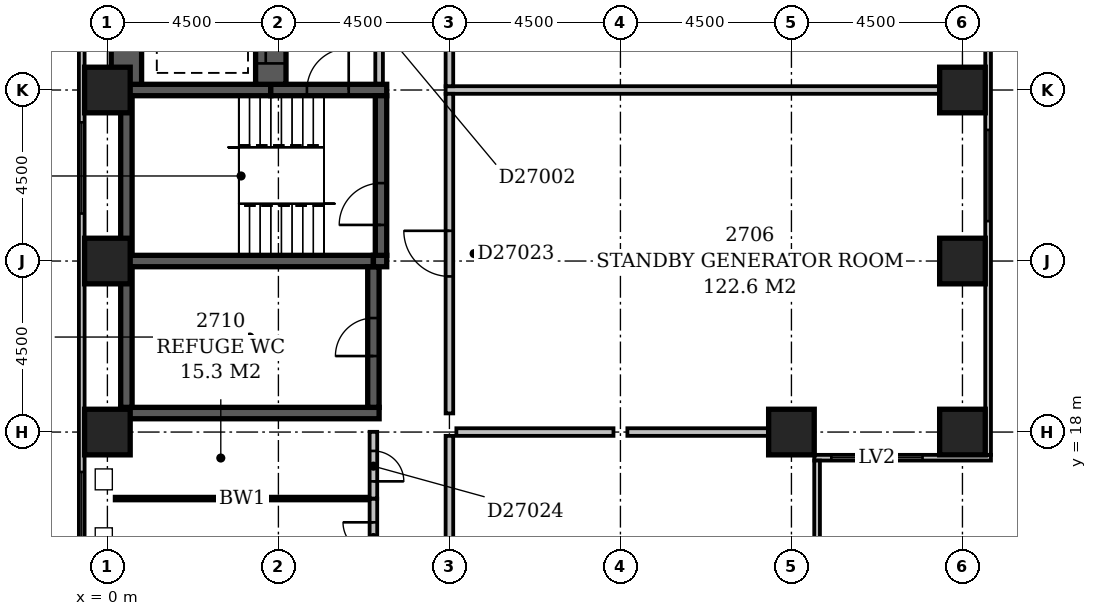
"""IFC4 building model, lengths in metres.
Left out: names, types, materials, properties, quantities, classifications, styles, units other than length and angle.
Written with IfcOpenShell. Run it as: python <this file> out.ifc"""

import sys

from ifc_helpers import new_model, si_unit, direction, frame, frame_2d, origin, origin_2d, place, context, subcontext, project, spatial, rectangle, extrude, element, fill, save


model = new_model("IFC4")
c1 = context("Model", 3, precision=1e-05, world=origin(), true_north=direction((0.0, 1.0)))
c2 = subcontext(c1, "Body", "Model", "MODEL_VIEW")
j1 = project(units=[si_unit("LENGTHUNIT", "METRE"), si_unit("PLANEANGLEUNIT", "RADIAN")], contexts=[c1])
p1 = place(None, origin())
s1 = spatial("IfcSite", under=j1, at=p1, CompositionType="ELEMENT")
p2 = place(p1, origin())
s2 = spatial("IfcBuilding", under=s1, at=p2, CompositionType="ELEMENT")
p3 = place(p2, frame((0.0, 0.0, 108.2)))
s3 = spatial("IfcBuildingStorey", under=s2, at=p3, CompositionType="ELEMENT", Elevation=108.2)
p4 = place(p3, frame((0.35, 18.5, -0.45), z_axis=(0.0, 0.0, 1.0), x_axis=(1.0, 0.0, 0.0)))
e1 = element("IfcWall", 1, at=p4, inside=s3, PredefinedType="SHEAR", context=c2, shape_type="SweptSolid", body=[
    extrude(rectangle(XDim=6.8, YDim=0.3, at=frame_2d((3.4, 0.0))), origin(), (0.0, 0.0, 1.0), 5.35),
])
p5 = place(p3, frame((0.35, 22.5, -0.45), z_axis=(0.0, 0.0, 1.0), x_axis=(1.0, 0.0, 0.0)))
e2 = element("IfcWall", 2, at=p5, inside=s3, PredefinedType="SHEAR", context=c2, shape_type="SweptSolid", body=[
    extrude(rectangle(XDim=6.65, YDim=0.3, at=frame_2d((3.325, 0.0))), origin(), (0.0, 0.0, 1.0), 5.35),
])
p6 = place(p3, frame((0.35, 27.0, -0.45), z_axis=(0.0, 0.0, 1.0), x_axis=(1.0, 0.0, 0.0)))
e3 = element("IfcWall", 3, at=p6, inside=s3, PredefinedType="SHEAR", context=c2, shape_type="SweptSolid", body=[
    extrude(rectangle(XDim=3.95, YDim=0.3, at=frame_2d((1.975, 0.0))), origin(), (0.0, 0.0, 1.0), 5.35),
])
p7 = place(p3, frame((0.5, 18.65, -0.45), z_axis=(0.0, 0.0, 1.0), x_axis=(0.0, 1.0, 0.0)))
e4 = element("IfcWall", 4, at=p7, inside=s3, PredefinedType="SHEAR", context=c2, shape_type="SweptSolid", body=[
    extrude(rectangle(XDim=3.7, YDim=0.3, at=frame_2d((1.85, 0.0))), origin(), (0.0, 0.0, 1.0), 5.35),
])
p8 = place(p3, frame((0.5, 22.65, -0.45), z_axis=(0.0, 0.0, 1.0), x_axis=(0.0, 1.0, 0.0)))
e5 = element("IfcWall", 5, at=p8, inside=s3, PredefinedType="SHEAR", context=c2, shape_type="SweptSolid", body=[
    extrude(rectangle(XDim=4.2, YDim=0.3, at=frame_2d((2.1, 0.0))), origin(), (0.0, 0.0, 1.0), 5.35),
])
p9 = place(p3, frame((0.5, 27.15, 0.0), z_axis=(0.0, 0.0, 1.0), x_axis=(0.0, 1.0, 0.0)))
e6 = element("IfcWall", 6, at=p9, inside=s3, PredefinedType="SHEAR", context=c2, shape_type="SweptSolid", body=[
    extrude(rectangle(XDim=21.95, YDim=0.8, at=frame_2d((10.975, 0.0))), origin(), (0.0, 0.0, 1.0), 4.9),
])
p10 = place(p3, frame((4.3, 27.0, -0.45), z_axis=(0.0, 0.0, 1.0), x_axis=(1.0, 0.0, 0.0)))
e7 = element("IfcWall", 7, at=p10, inside=s3, PredefinedType="SHEAR", context=c2, shape_type="SweptSolid", body=[
    extrude(rectangle(XDim=3.05, YDim=0.3, at=frame_2d((1.525, 0.0))), origin(), (0.0, 0.0, 1.0), 5.35),
])
p11 = place(p10, frame((0.95, 0.0, 0.45)))
e8 = element("IfcOpeningElement", 8, at=p11, cuts=e7, PredefinedType="OPENING", context=c2, shape_type="SweptSolid", body=[
    extrude(rectangle(XDim=1.1, YDim=2.1, at=frame_2d((0.55, 1.05))), frame((0.0, 0.162, 0.0), z_axis=(0.0, -1.0, 0.0), x_axis=(1.0, 0.0, 0.0)), (0.0, 0.0, 1.0), 0.324),
])
p12 = place(p3, frame((4.3, 27.15, 0.0), z_axis=(0.0, 0.0, 1.0), x_axis=(0.0, 1.0, 0.0)))
e9 = element("IfcWall", 9, at=p12, inside=s3, PredefinedType="SHEAR", context=c2, shape_type="SweptSolid", body=[
    extrude(rectangle(XDim=21.95, YDim=0.8, at=frame_2d((10.975, 0.0))), origin(), (0.0, 0.0, 1.0), 4.9),
])
p13 = place(p12, frame((3.05, 0.0, 0.0)))
e10 = element("IfcOpeningElement", 10, at=p13, cuts=e9, PredefinedType="OPENING", context=c2, shape_type="SweptSolid", body=[
    extrude(rectangle(XDim=1.1, YDim=2.1, at=frame_2d((0.55, 1.05))), frame((0.0, 0.412, 0.0), z_axis=(0.0, -1.0, 0.0), x_axis=(1.0, 0.0, 0.0)), (0.0, 0.0, 1.0), 0.824),
])
p14 = place(p12, frame((0.55, 0.0, 0.0)))
e11 = element("IfcOpeningElement", 11, at=p14, cuts=e9, PredefinedType="OPENING", context=c2, shape_type="SweptSolid", body=[
    extrude(rectangle(XDim=1.1, YDim=2.1, at=frame_2d((0.55, 1.05))), frame((0.0, 0.412, 0.0), z_axis=(0.0, -1.0, 0.0), x_axis=(1.0, 0.0, 0.0)), (0.0, 0.0, 1.0), 0.824),
])
p15 = place(p12, frame((5.55, 0.0, 0.0)))
e12 = element("IfcOpeningElement", 12, at=p15, cuts=e9, PredefinedType="OPENING", context=c2, shape_type="SweptSolid", body=[
    extrude(rectangle(XDim=1.1, YDim=2.1, at=frame_2d((0.55, 1.05))), frame((0.0, 0.412, 0.0), z_axis=(0.0, -1.0, 0.0), x_axis=(1.0, 0.0, 0.0)), (0.0, 0.0, 1.0), 0.824),
])
p16 = place(p3, frame((7.0, 18.65, -0.45), z_axis=(0.0, 0.0, 1.0), x_axis=(0.0, 1.0, 0.0)))
e13 = element("IfcWall", 13, at=p16, inside=s3, PredefinedType="SHEAR", context=c2, shape_type="SweptSolid", body=[
    extrude(rectangle(XDim=3.7, YDim=0.3, at=frame_2d((1.85, 0.0))), origin(), (0.0, 0.0, 1.0), 5.35),
])
p17 = place(p16, frame((1.35, 0.0, 0.45)))
e14 = element("IfcOpeningElement", 14, at=p17, cuts=e13, PredefinedType="OPENING", context=c2, shape_type="SweptSolid", body=[
    extrude(rectangle(XDim=1.0, YDim=2.1, at=frame_2d((0.5, 1.05))), frame((0.0, 0.162, 0.0), z_axis=(0.0, -1.0, 0.0), x_axis=(1.0, 0.0, 0.0)), (0.0, 0.0, 1.0), 0.324),
])
p18 = place(p3, frame((7.0, 22.5, -0.45), z_axis=(0.0, 0.0, 1.0), x_axis=(1.0, 0.0, 0.0)))
e15 = element("IfcWall", 15, at=p18, inside=s3, PredefinedType="SHEAR", context=c2, shape_type="SweptSolid", body=[
    extrude(rectangle(XDim=0.35, YDim=0.3, at=frame_2d((0.175, 0.0))), origin(), (0.0, 0.0, 1.0), 5.35),
])
p19 = place(p3, frame((7.2, 22.65, -0.45), z_axis=(0.0, 0.0, 1.0), x_axis=(0.0, 1.0, 0.0)))
e16 = element("IfcWall", 16, at=p19, inside=s3, PredefinedType="SHEAR", context=c2, shape_type="SweptSolid", body=[
    extrude(rectangle(XDim=4.2, YDim=0.3, at=frame_2d((2.1, 0.0))), origin(), (0.0, 0.0, 1.0), 5.35),
])
p20 = place(p19, frame((0.8, 0.0, 0.45)))
e17 = element("IfcOpeningElement", 17, at=p20, cuts=e16, PredefinedType="OPENING", context=c2, shape_type="SweptSolid", body=[
    extrude(rectangle(XDim=1.1, YDim=2.1, at=frame_2d((0.55, 1.05))), frame((0.0, 0.162, 0.0), z_axis=(0.0, -1.0, 0.0), x_axis=(1.0, 0.0, 0.0)), (0.0, 0.0, 1.0), 0.324),
])
for number, where, z_axis, x_axis in (
    (18, (0.0, 18.0, -0.45), (0.0, 0.0, 1.0), (1.0, 0.0, 0.0)),
    (19, (18.0, 18.0, -0.45), (0.0, 0.0, 1.0), (1.0, 0.0, 0.0)),
    (20, (22.5, 18.0, -0.45), (0.0, 0.0, 1.0), (1.0, 0.0, 0.0)),
    (21, (0.0, 22.5, -0.45), (0.0, 0.0, 1.0), (1.0, 0.0, 0.0)),
    (22, (22.5, 22.5, -0.45), (0.0, 0.0, 1.0), (1.0, 0.0, 0.0)),
    (23, (0.0, 27.0, -0.45), (0.0, 0.0, 1.0), (1.0, 0.0, 0.0)),
    (24, (22.5, 27.0, -0.45), (0.0, 0.0, 1.0), (1.0, 0.0, 0.0)),
):
    element("IfcColumn", number, at=place(p3, frame(where, z_axis=z_axis, x_axis=x_axis)), inside=s3, PredefinedType="COLUMN", context=c2, shape_type="SweptSolid", body=[
        extrude(rectangle(XDim=1.2, YDim=1.2, at=origin_2d()), origin(), (0.0, 0.0, 1.0), 5.35),
    ])
p21 = place(p3, frame((18.675, 8.4, 0.0), z_axis=(0.0, 0.0, 1.0), x_axis=(0.0, 1.0, 0.0)))
e25 = element("IfcWall", 25, at=p21, inside=s3, PredefinedType="STANDARD", context=c2, shape_type="SweptSolid", body=[
    extrude(rectangle(XDim=8.85, YDim=0.15, at=frame_2d((4.425, 0.0))), origin(), (0.0, 0.0, 1.0), 4.3),
])
p22 = place(p21, frame((1.65, 0.0, 0.6)))
e26 = element("IfcOpeningElement", 26, at=p22, cuts=e25, PredefinedType="OPENING", context=c2, shape_type="SweptSolid", body=[
    extrude(rectangle(XDim=2.4, YDim=2.4, at=frame_2d((1.2, 1.2))), frame((0.0, 0.087, 0.0), z_axis=(0.0, -1.0, 0.0), x_axis=(1.0, 0.0, 0.0)), (0.0, 0.0, 1.0), 0.174),
])
p23 = place(p3, frame((18.6, 17.325, 0.0), z_axis=(0.0, 0.0, 1.0), x_axis=(1.0, 0.0, 0.0)))
e27 = element("IfcWall", 27, at=p23, inside=s3, PredefinedType="STANDARD", context=c2, shape_type="SweptSolid", body=[
    extrude(rectangle(XDim=4.65, YDim=0.15, at=frame_2d((2.325, 0.0))), origin(), (0.0, 0.0, 1.0), 4.3),
])
p24 = place(p23, frame((0.45, 0.0, 0.6)))
e28 = element("IfcOpeningElement", 28, at=p24, cuts=e27, PredefinedType="OPENING", context=c2, shape_type="SweptSolid", body=[
    extrude(rectangle(XDim=2.4, YDim=2.4, at=frame_2d((1.2, 1.2))), frame((0.0, 0.087, 0.0), z_axis=(0.0, -1.0, 0.0), x_axis=(1.0, 0.0, 0.0)), (0.0, 0.0, 1.0), 0.174),
])
p25 = place(p3, frame((23.175, 17.4, 0.0), z_axis=(0.0, 0.0, 1.0), x_axis=(0.0, 1.0, 0.0)))
e29 = element("IfcWall", 29, at=p25, inside=s3, PredefinedType="STANDARD", context=c2, shape_type="SweptSolid", body=[
    extrude(rectangle(XDim=17.85, YDim=0.15, at=frame_2d((8.925, 0.0))), origin(), (0.0, 0.0, 1.0), 4.3),
])
p26 = place(p25, frame((6.15, 0.0, 0.6)))
e30 = element("IfcOpeningElement", 30, at=p26, cuts=e29, PredefinedType="OPENING", context=c2, shape_type="SweptSolid", body=[
    extrude(rectangle(XDim=2.4, YDim=2.4, at=frame_2d((1.2, 1.2))), frame((0.0, 0.087, 0.0), z_axis=(0.0, -1.0, 0.0), x_axis=(1.0, 0.0, 0.0)), (0.0, 0.0, 1.0), 0.174),
])
p27 = place(p25, frame((15.15, 0.0, 0.6)))
e31 = element("IfcOpeningElement", 31, at=p27, cuts=e29, PredefinedType="OPENING", context=c2, shape_type="SweptSolid", body=[
    extrude(rectangle(XDim=2.4, YDim=2.4, at=frame_2d((1.2, 1.2))), frame((0.0, 0.087, 0.0), z_axis=(0.0, -1.0, 0.0), x_axis=(1.0, 0.0, 0.0)), (0.0, 0.0, 1.0), 0.174),
])
p28 = place(p3, frame((-0.675, 59.1, 0.0), z_axis=(0.0, 0.0, 1.0), x_axis=(0.0, -1.0, 0.0)))
e32 = element("IfcWall", 32, at=p28, inside=s3, PredefinedType="STANDARD", context=c2, shape_type="SweptSolid", body=[
    extrude(rectangle(XDim=55.35, YDim=0.15, at=frame_2d((27.675, 0.0))), origin(), (0.0, 0.0, 1.0), 4.3),
])
p29 = place(p28, frame((5.95, 0.0, 0.6)))
e33 = element("IfcOpeningElement", 33, at=p29, cuts=e32, PredefinedType="OPENING", context=c2, shape_type="SweptSolid", body=[
    extrude(rectangle(XDim=2.4, YDim=2.4, at=frame_2d((1.2, 1.2))), frame((0.0, 0.087, 0.0), z_axis=(0.0, -1.0, 0.0), x_axis=(1.0, 0.0, 0.0)), (0.0, 0.0, 1.0), 0.174),
])
p30 = place(p28, frame((15.15, 0.0, 0.6)))
e34 = element("IfcOpeningElement", 34, at=p30, cuts=e32, PredefinedType="OPENING", context=c2, shape_type="SweptSolid", body=[
    extrude(rectangle(XDim=2.4, YDim=2.4, at=frame_2d((1.2, 1.2))), frame((0.0, 0.087, 0.0), z_axis=(0.0, -1.0, 0.0), x_axis=(1.0, 0.0, 0.0)), (0.0, 0.0, 1.0), 0.174),
])
p31 = place(p28, frame((24.15, 0.0, 0.6)))
e35 = element("IfcOpeningElement", 35, at=p31, cuts=e32, PredefinedType="OPENING", context=c2, shape_type="SweptSolid", body=[
    extrude(rectangle(XDim=2.4, YDim=2.4, at=frame_2d((1.2, 1.2))), frame((0.0, 0.087, 0.0), z_axis=(0.0, -1.0, 0.0), x_axis=(1.0, 0.0, 0.0)), (0.0, 0.0, 1.0), 0.174),
])
p32 = place(p28, frame((32.95, 0.0, 0.6)))
e36 = element("IfcOpeningElement", 36, at=p32, cuts=e32, PredefinedType="OPENING", context=c2, shape_type="SweptSolid", body=[
    extrude(rectangle(XDim=2.4, YDim=2.4, at=frame_2d((1.2, 1.2))), frame((0.0, 0.087, 0.0), z_axis=(0.0, -1.0, 0.0), x_axis=(1.0, 0.0, 0.0)), (0.0, 0.0, 1.0), 0.174),
])
p33 = place(p28, frame((42.15, 0.0, 0.6)))
e37 = element("IfcOpeningElement", 37, at=p33, cuts=e32, PredefinedType="OPENING", context=c2, shape_type="SweptSolid", body=[
    extrude(rectangle(XDim=2.4, YDim=2.4, at=frame_2d((1.2, 1.2))), frame((0.0, 0.087, 0.0), z_axis=(0.0, -1.0, 0.0), x_axis=(1.0, 0.0, 0.0)), (0.0, 0.0, 1.0), 0.174),
])
p34 = place(p28, frame((51.15, 0.0, 0.6)))
e38 = element("IfcOpeningElement", 38, at=p34, cuts=e32, PredefinedType="OPENING", context=c2, shape_type="SweptSolid", body=[
    extrude(rectangle(XDim=2.4, YDim=2.4, at=frame_2d((1.2, 1.2))), frame((0.0, 0.087, 0.0), z_axis=(0.0, -1.0, 0.0), x_axis=(1.0, 0.0, 0.0)), (0.0, 0.0, 1.0), 0.174),
])
p35 = place(p3, frame((7.15, 27.17, 0.0), z_axis=(0.0, 0.0, 1.0), x_axis=(0.0, 1.0, 0.0)))
e39 = element("IfcWall", 39, at=p35, inside=s3, PredefinedType="PARTITIONING", context=c2, shape_type="SweptSolid", body=[
    extrude(rectangle(XDim=4.83, YDim=0.2, at=frame_2d((2.415, 0.0))), origin(), (0.0, 0.0, 1.0), 4.9),
])
p36 = place(p35, frame((1.73, 0.0, 0.0)))
e40 = element("IfcOpeningElement", 40, at=p36, cuts=e39, PredefinedType="OPENING", context=c2, shape_type="SweptSolid", body=[
    extrude(rectangle(XDim=1.2, YDim=2.1, at=frame_2d((0.6, 1.05))), frame((0.0, 0.112, 0.0), z_axis=(0.0, -1.0, 0.0), x_axis=(1.0, 0.0, 0.0)), (0.0, 0.0, 1.0), 0.224),
])
p37 = place(p3, frame((9.0, 9.1, 0.0), z_axis=(0.0, 0.0, 1.0), x_axis=(0.0, 1.0, 0.0)))
e41 = element("IfcWall", 41, at=p37, inside=s3, PredefinedType="PARTITIONING", context=c2, shape_type="SweptSolid", body=[
    extrude(rectangle(XDim=8.8, YDim=0.2, at=frame_2d((4.4, 0.0))), origin(), (0.0, 0.0, 1.0), 4.9),
])
p38 = place(p37, frame((3.8, 0.0, 0.0)))
e42 = element("IfcOpeningElement", 42, at=p38, cuts=e41, PredefinedType="OPENING", context=c2, shape_type="SweptSolid", body=[
    extrude(rectangle(XDim=1.2, YDim=2.1, at=frame_2d((0.6, 1.05))), frame((0.0, 0.112, 0.0), z_axis=(0.0, -1.0, 0.0), x_axis=(1.0, 0.0, 0.0)), (0.0, 0.0, 1.0), 0.224),
])
p39 = place(p3, frame((0.191, 16.25, 0.0), z_axis=(0.0, 0.0, 1.0), x_axis=(1.0, 0.0, 0.0)))
e43 = element("IfcWall", 43, at=p39, inside=s3, PredefinedType="PLUMBINGWALL", context=c2, shape_type="SweptSolid", body=[
    extrude(rectangle(XDim=6.708, YDim=0.1, at=frame_2d((3.354, 0.0))), origin(), (0.0, 0.0, 1.0), 4.9),
])
p40 = place(p3, frame((7.0, 16.25, 0.0), z_axis=(0.0, 0.0, 1.0), x_axis=(0.0, -1.0, 0.0)))
e44 = element("IfcWall", 44, at=p40, inside=s3, PredefinedType="PARTITIONING", context=c2, shape_type="SweptSolid", body=[
    extrude(rectangle(XDim=2.1, YDim=0.2, at=frame_2d((1.05, 0.0))), origin(), (0.0, 0.0, 1.0), 4.9),
])
p41 = place(p40, frame((0.625, 0.0, 0.0)))
e45 = element("IfcOpeningElement", 45, at=p41, cuts=e44, PredefinedType="OPENING", context=c2, shape_type="SweptSolid", body=[
    extrude(rectangle(XDim=0.8, YDim=2.1, at=frame_2d((0.4, 1.05))), frame((0.0, 0.112, 0.0), z_axis=(0.0, -1.0, 0.0), x_axis=(1.0, 0.0, 0.0)), (0.0, 0.0, 1.0), 0.224),
])
p42 = place(p3, frame((9.0, 18.49, 0.0), z_axis=(0.0, 0.0, 1.0), x_axis=(0.0, 1.0, 0.0)))
e46 = element("IfcWall", 46, at=p42, inside=s3, PredefinedType="PARTITIONING", context=c2, shape_type="SweptSolid", body=[
    extrude(rectangle(XDim=8.409, YDim=0.2, at=frame_2d((4.205, 0.0))), origin(), (0.0, 0.0, 1.0), 4.9),
])
p43 = place(p42, frame((3.605, 0.0, 0.0)))
e47 = element("IfcOpeningElement", 47, at=p43, cuts=e46, PredefinedType="OPENING", context=c2, shape_type="SweptSolid", body=[
    extrude(rectangle(XDim=1.2, YDim=2.1, at=frame_2d((0.6, 1.05))), frame((0.0, 0.112, 0.0), z_axis=(0.0, -1.0, 0.0), x_axis=(1.0, 0.0, 0.0)), (0.0, 0.0, 1.0), 0.224),
])
p44 = place(p3, frame((17.809, 18.0, 0.0), z_axis=(0.0, 0.0, 1.0), x_axis=(-1.0, 0.0, 0.0)))
e48 = element("IfcWall", 48, at=p44, inside=s3, PredefinedType="PARTITIONING", context=c2, shape_type="SweptSolid", body=[
    extrude(rectangle(XDim=4.125, YDim=0.2, at=frame_2d((2.063, 0.0))), origin(), (0.0, 0.0, 1.0), 4.9),
])
p45 = place(p3, frame((13.317, 18.0, 0.0), z_axis=(0.0, 0.0, 1.0), x_axis=(-1.0, 0.0, 0.0)))
e49 = element("IfcWall", 49, at=p45, inside=s3, PredefinedType="PARTITIONING", context=c2, shape_type="SweptSolid", body=[
    extrude(rectangle(XDim=4.134, YDim=0.2, at=frame_2d((2.067, 0.0))), origin(), (0.0, 0.0, 1.0), 4.9),
])
p46 = place(p3, frame((7.0, 18.006, 0.0), z_axis=(0.0, 0.0, 1.0), x_axis=(0.0, -1.0, 0.0)))
e50 = element("IfcWall", 50, at=p46, inside=s3, PredefinedType="PARTITIONING", context=c2, shape_type="SweptSolid", body=[
    extrude(rectangle(XDim=1.756, YDim=0.2, at=frame_2d((0.878, 0.0))), origin(), (0.0, 0.0, 1.0), 4.9),
])
p47 = place(p46, frame((0.503, 0.0, 0.0)))
e51 = element("IfcOpeningElement", 51, at=p47, cuts=e50, PredefinedType="OPENING", context=c2, shape_type="SweptSolid", body=[
    extrude(rectangle(XDim=0.8, YDim=2.1, at=frame_2d((0.4, 1.05))), frame((0.0, 0.112, 0.0), z_axis=(0.0, -1.0, 0.0), x_axis=(1.0, 0.0, 0.0)), (0.0, 0.0, 1.0), 0.224),
])
p48 = place(p3, frame((9.0, 27.1, 0.0), z_axis=(0.0, 0.0, 1.0), x_axis=(0.0, 1.0, 0.0)))
e52 = element("IfcWall", 52, at=p48, inside=s3, PredefinedType="PARTITIONING", context=c2, shape_type="SweptSolid", body=[
    extrude(rectangle(XDim=8.8, YDim=0.2, at=frame_2d((4.4, 0.0))), origin(), (0.0, 0.0, 1.0), 4.9),
])
p49 = place(p48, frame((3.8, 0.0, 0.0)))
e53 = element("IfcOpeningElement", 53, at=p49, cuts=e52, PredefinedType="OPENING", context=c2, shape_type="SweptSolid", body=[
    extrude(rectangle(XDim=1.2, YDim=2.1, at=frame_2d((0.6, 1.05))), frame((0.0, 0.112, 0.0), z_axis=(0.0, -1.0, 0.0), x_axis=(1.0, 0.0, 0.0)), (0.0, 0.0, 1.0), 0.224),
])
p50 = place(p3, frame((22.309, 27.0, 0.0), z_axis=(0.0, 0.0, 1.0), x_axis=(-1.0, 0.0, 0.0)))
e54 = element("IfcWall", 54, at=p50, inside=s3, PredefinedType="PARTITIONING", context=c2, shape_type="SweptSolid", body=[
    extrude(rectangle(XDim=13.409, YDim=0.2, at=frame_2d((6.704, 0.0))), origin(), (0.0, 0.0, 1.0), 4.3),
])
p51 = place(p24, origin())
e55 = element("IfcWindow", 55, at=p51, inside=s3, PartitioningType="SINGLE_PANEL", PredefinedType="USERDEFINED", context=c2, shape_type="SweptSolid", body=[
    extrude(rectangle(XDim=2.4, YDim=2.4, at=frame_2d((1.2, 1.2))), frame((0.0, 0.03, 0.0), z_axis=(0.0, -1.0, 0.0), x_axis=(1.0, 0.0, 0.0)), (0.0, 0.0, 1.0), 0.06),
])
fill(e28, e55)
p52 = place(p26, origin())
e56 = element("IfcWindow", 56, at=p52, inside=s3, PartitioningType="SINGLE_PANEL", PredefinedType="USERDEFINED", context=c2, shape_type="SweptSolid", body=[
    extrude(rectangle(XDim=2.4, YDim=2.4, at=frame_2d((1.2, 1.2))), frame((0.0, 0.03, 0.0), z_axis=(0.0, -1.0, 0.0), x_axis=(1.0, 0.0, 0.0)), (0.0, 0.0, 1.0), 0.06),
])
fill(e30, e56)
p53 = place(p32, origin())
e57 = element("IfcWindow", 57, at=p53, inside=s3, PartitioningType="SINGLE_PANEL", PredefinedType="USERDEFINED", context=c2, shape_type="SweptSolid", body=[
    extrude(rectangle(XDim=2.4, YDim=2.4, at=frame_2d((1.2, 1.2))), frame((0.0, 0.03, 0.0), z_axis=(0.0, -1.0, 0.0), x_axis=(1.0, 0.0, 0.0)), (0.0, 0.0, 1.0), 0.06),
])
fill(e36, e57)
p54 = place(p33, origin())
e58 = element("IfcWindow", 58, at=p54, inside=s3, PartitioningType="SINGLE_PANEL", PredefinedType="USERDEFINED", context=c2, shape_type="SweptSolid", body=[
    extrude(rectangle(XDim=2.4, YDim=2.4, at=frame_2d((1.2, 1.2))), frame((0.0, 0.03, 0.0), z_axis=(0.0, -1.0, 0.0), x_axis=(1.0, 0.0, 0.0)), (0.0, 0.0, 1.0), 0.06),
])
fill(e37, e58)
p55 = place(p14, origin())
e59 = element("IfcDoor", 59, at=p55, inside=s3, OperationType="SLIDING_TO_LEFT", PredefinedType="DOOR", context=c2, shape_type="SweptSolid", body=[
    extrude(rectangle(XDim=1.1, YDim=2.1, at=frame_2d((0.55, 1.05))), frame((0.0, 0.025, 0.0), z_axis=(0.0, -1.0, 0.0), x_axis=(1.0, 0.0, 0.0)), (0.0, 0.0, 1.0), 0.05),
])
fill(e11, e59)
p56 = place(p17, origin())
e60 = element("IfcDoor", 60, at=p56, inside=s3, OperationType="SINGLE_SWING_LEFT", PredefinedType="DOOR", context=c2, shape_type="SweptSolid", body=[
    extrude(rectangle(XDim=1.0, YDim=2.1, at=frame_2d((0.5, 1.05))), frame((0.0, 0.025, 0.0), z_axis=(0.0, -1.0, 0.0), x_axis=(1.0, 0.0, 0.0)), (0.0, 0.0, 1.0), 0.05),
])
fill(e14, e60)
p57 = place(p11, frame((1.1, 0.0, 0.0), z_axis=(0.0, 0.0, 1.0), x_axis=(-1.0, 0.0, 0.0)))
e61 = element("IfcDoor", 61, at=p57, inside=s3, OperationType="SINGLE_SWING_LEFT", PredefinedType="DOOR", context=c2, shape_type="SweptSolid", body=[
    extrude(rectangle(XDim=1.1, YDim=2.1, at=frame_2d((0.55, 1.05))), frame((0.0, 0.025, 0.0), z_axis=(0.0, -1.0, 0.0), x_axis=(1.0, 0.0, 0.0)), (0.0, 0.0, 1.0), 0.05),
])
fill(e8, e61)
p58 = place(p20, origin())
e62 = element("IfcDoor", 62, at=p58, inside=s3, OperationType="SINGLE_SWING_LEFT", PredefinedType="DOOR", context=c2, shape_type="SweptSolid", body=[
    extrude(rectangle(XDim=1.1, YDim=2.1, at=frame_2d((0.55, 1.05))), frame((0.0, 0.025, 0.0), z_axis=(0.0, -1.0, 0.0), x_axis=(1.0, 0.0, 0.0)), (0.0, 0.0, 1.0), 0.05),
])
fill(e17, e62)
p59 = place(p41, frame((0.8, 0.0, 0.0), z_axis=(0.0, 0.0, 1.0), x_axis=(-1.0, 0.0, 0.0)))
e63 = element("IfcDoor", 63, at=p59, inside=s3, OperationType="SINGLE_SWING_RIGHT", PredefinedType="DOOR", context=c2, shape_type="SweptSolid", body=[
    extrude(rectangle(XDim=0.8, YDim=2.1, at=frame_2d((0.4, 1.05))), frame((0.0, 0.025, 0.0), z_axis=(0.0, -1.0, 0.0), x_axis=(1.0, 0.0, 0.0)), (0.0, 0.0, 1.0), 0.05),
])
fill(e45, e63)
p60 = place(p43, frame((1.2, 0.0, 0.0), z_axis=(0.0, 0.0, 1.0), x_axis=(-1.0, 0.0, 0.0)))
e64 = element("IfcDoor", 64, at=p60, inside=s3, OperationType="SINGLE_SWING_LEFT", PredefinedType="DOOR", context=c2, shape_type="SweptSolid", body=[
    extrude(rectangle(XDim=1.2, YDim=2.1, at=frame_2d((0.6, 1.05))), frame((0.0, 0.025, 0.0), z_axis=(0.0, -1.0, 0.0), x_axis=(1.0, 0.0, 0.0)), (0.0, 0.0, 1.0), 0.05),
])
fill(e47, e64)
p61 = place(p47, frame((0.8, 0.0, 0.0), z_axis=(0.0, 0.0, 1.0), x_axis=(-1.0, 0.0, 0.0)))
e65 = element("IfcDoor", 65, at=p61, inside=s3, OperationType="SINGLE_SWING_LEFT", PredefinedType="DOOR", context=c2, shape_type="SweptSolid", body=[
    extrude(rectangle(XDim=0.8, YDim=2.1, at=frame_2d((0.4, 1.05))), frame((0.0, 0.025, 0.0), z_axis=(0.0, -1.0, 0.0), x_axis=(1.0, 0.0, 0.0)), (0.0, 0.0, 1.0), 0.05),
])
fill(e51, e65)
save(model, sys.argv[1])
